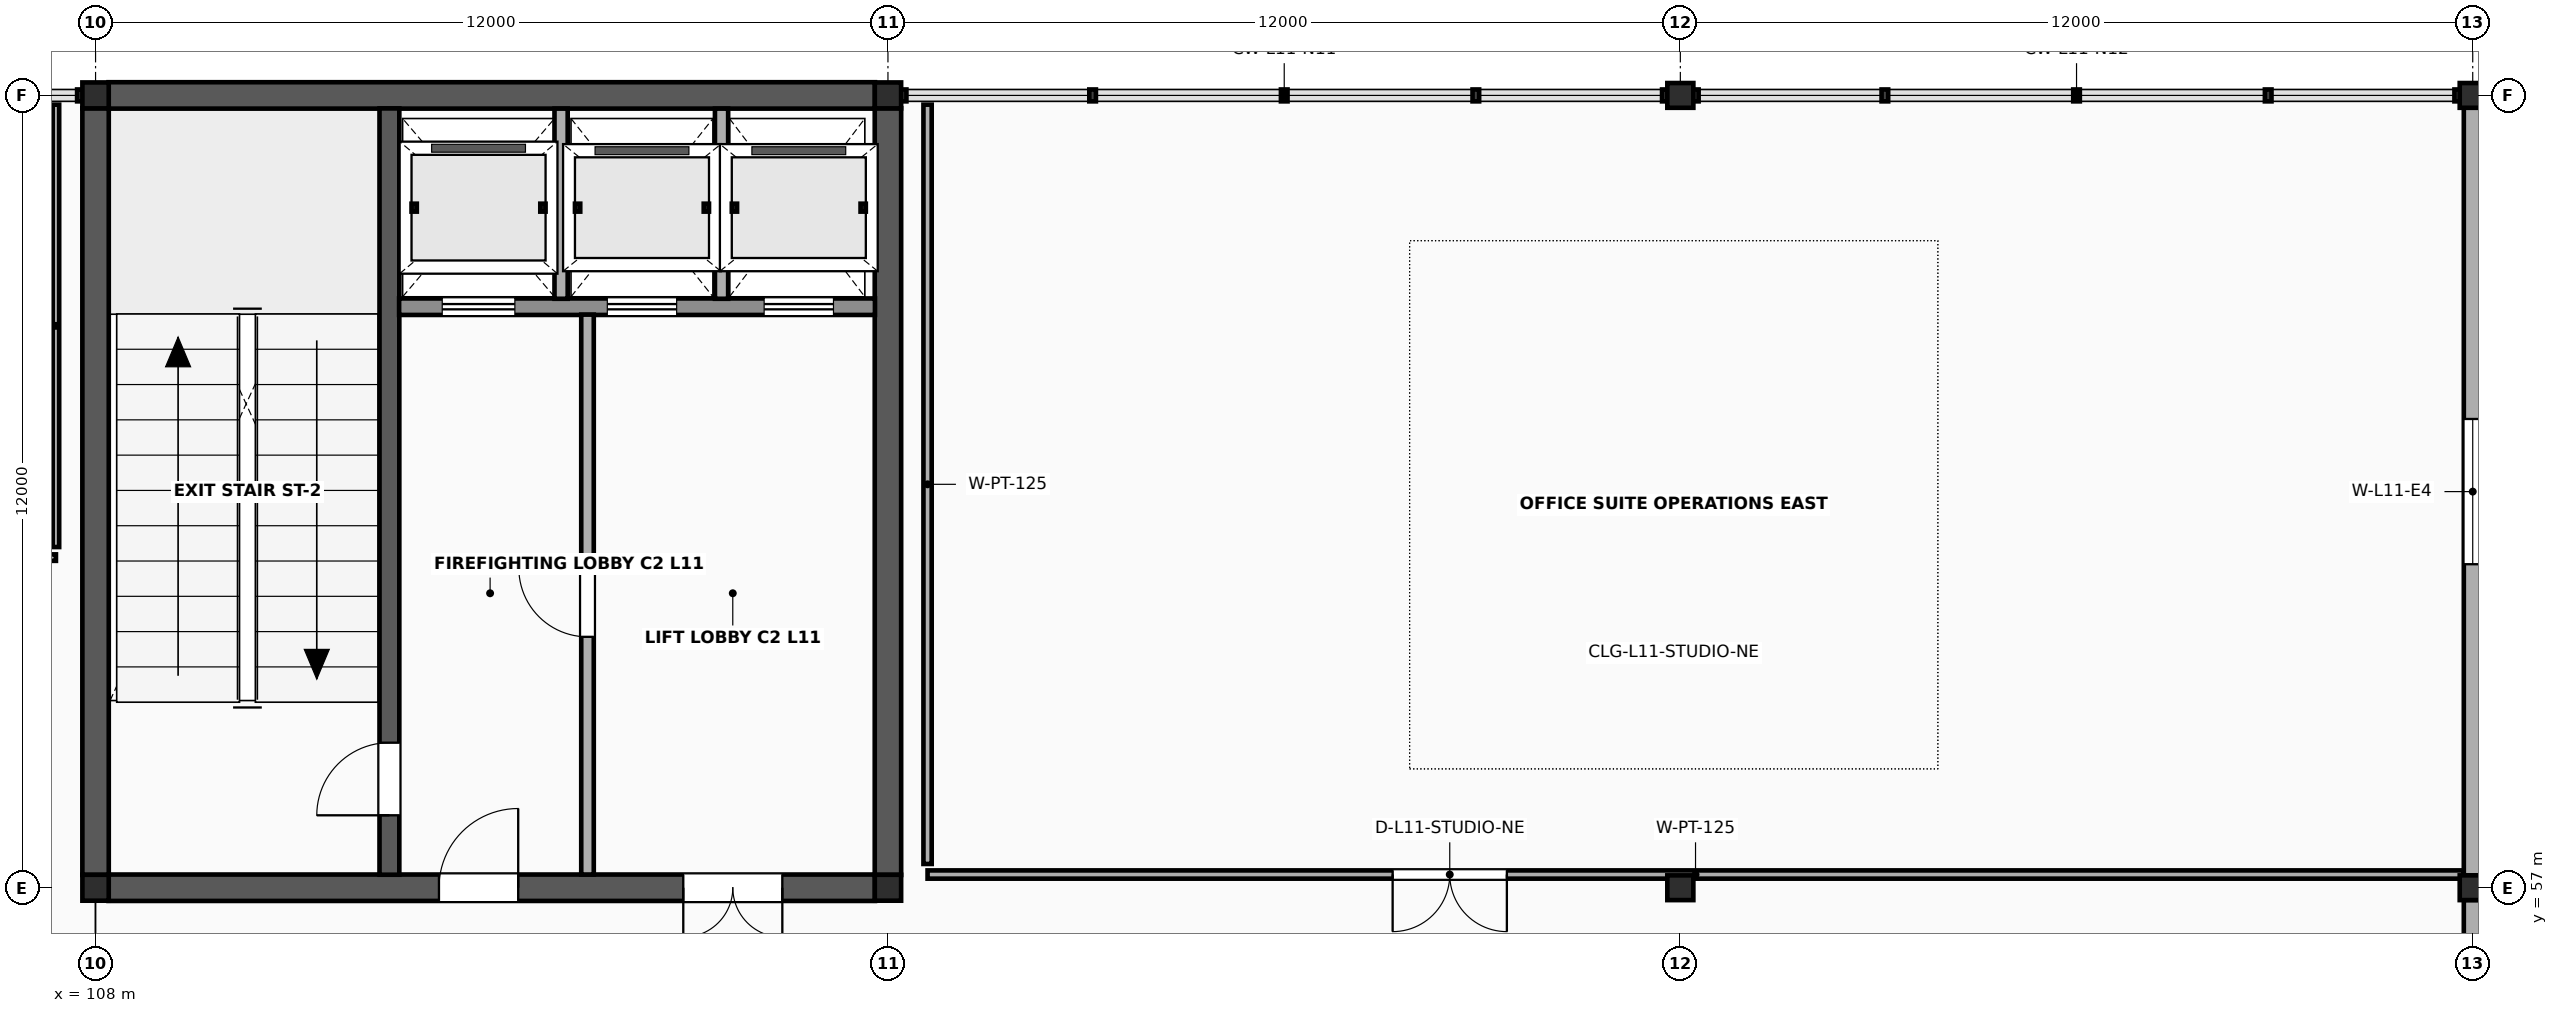
"""IFC4 building model, lengths in metres.
Left out: names, types, materials, properties, quantities, classifications, styles, units other than length and angle.
Written with IfcOpenShell. Run it as: python <this file> out.ifc"""

import sys

from ifc_helpers import new_model, si_unit, direction, frame, frame_2d, origin, origin_2d, place, context, subcontext, project, spatial, rectangle, i_section, extrude, element, fill, save


model = new_model("IFC4")
c1 = context("Model", 3, precision=1e-05, world=origin(), true_north=direction((0.0, 1.0)))
c2 = subcontext(c1, "Body", "Model", "MODEL_VIEW")
j1 = project(units=[si_unit("LENGTHUNIT", "METRE"), si_unit("PLANEANGLEUNIT", "RADIAN")], contexts=[c1])
p1 = place(None, origin())
s1 = spatial("IfcSite", under=j1, at=p1, CompositionType="ELEMENT")
p2 = place(p1, origin())
s2 = spatial("IfcBuilding", under=s1, at=p2, CompositionType="ELEMENT")
p3 = place(p2, frame((0.0, 0.0, 45.6)))
s3 = spatial("IfcBuildingStorey", under=s2, at=p3, CompositionType="ELEMENT", Elevation=45.6)
for number, where, z_axis, x_axis in (
    (1, (108.0, 57.0, 0.0), (0.0, 0.0, 1.0), (1.0, 0.0, 0.0)),
    (2, (108.0, 69.0, 0.0), (0.0, 0.0, 1.0), (1.0, 0.0, 0.0)),
    (3, (120.0, 57.0, 0.0), (0.0, 0.0, 1.0), (1.0, 0.0, 0.0)),
    (4, (120.0, 69.0, 0.0), (0.0, 0.0, 1.0), (1.0, 0.0, 0.0)),
):
    element("IfcColumn", number, at=place(p3, frame(where, z_axis=z_axis, x_axis=x_axis)), inside=s3, PredefinedType="COLUMN", context=c2, shape_type="SweptSolid", body=[
        extrude(i_section(OverallWidth=0.399, OverallDepth=0.393, WebThickness=0.023, FlangeThickness=0.037, FilletRadius=0.018, at=origin_2d()), origin(), (0.0, 0.0, 1.0), 4.0),
    ])
for number, where, z_axis, x_axis in (
    (5, (132.0, 57.0, 0.0), (0.0, 0.0, 1.0), (1.0, 0.0, 0.0)),
    (6, (132.0, 69.0, 0.0), (0.0, 0.0, 1.0), (1.0, 0.0, 0.0)),
    (7, (144.0, 57.0, 0.0), (0.0, 0.0, 1.0), (1.0, 0.0, 0.0)),
    (8, (144.0, 69.0, 0.0), (0.0, 0.0, 1.0), (1.0, 0.0, 0.0)),
):
    element("IfcColumn", number, at=place(p3, frame(where, z_axis=z_axis, x_axis=x_axis)), inside=s3, PredefinedType="COLUMN", context=c2, shape_type="SweptSolid", body=[
        extrude(i_section(OverallWidth=0.394, OverallDepth=0.375, WebThickness=0.017, FlangeThickness=0.028, FilletRadius=0.018, at=origin_2d()), origin(), (0.0, 0.0, 1.0), 4.0),
    ])
p4 = place(p3, frame((108.197, 57.0, 0.0), z_axis=(0.0, 0.0, 1.0), x_axis=(1.0, 0.0, 0.0)))
e9 = element("IfcWall", 9, at=p4, inside=s3, PredefinedType="SHEAR", context=c2, shape_type="SweptSolid", body=[
    extrude(rectangle(XDim=11.607, YDim=0.4, at=frame_2d((5.803, 0.0))), origin(), (0.0, 0.0, 1.0), 3.843),
])
p5 = place(p4, frame((5.004, 0.0, 0.0)))
e10 = element("IfcOpeningElement", 10, at=p5, cuts=e9, PredefinedType="OPENING", context=c2, shape_type="SweptSolid", body=[
    extrude(rectangle(XDim=1.2, YDim=2.2, at=frame_2d((0.6, 1.1))), frame((0.0, 0.215, 0.0), z_axis=(0.0, -1.0, 0.0), x_axis=(1.0, 0.0, 0.0)), (0.0, 0.0, 1.0), 0.43),
])
p6 = place(p4, frame((8.704, 0.0, 0.0)))
e11 = element("IfcOpeningElement", 11, at=p6, cuts=e9, PredefinedType="OPENING", context=c2, shape_type="SweptSolid", body=[
    extrude(rectangle(XDim=1.5, YDim=2.25, at=frame_2d((0.75, 1.125))), frame((0.0, 0.215, 0.0), z_axis=(0.0, -1.0, 0.0), x_axis=(1.0, 0.0, 0.0)), (0.0, 0.0, 1.0), 0.43),
])
p7 = place(p3, frame((108.197, 69.0, 0.0), z_axis=(0.0, 0.0, 1.0), x_axis=(1.0, 0.0, 0.0)))
e12 = element("IfcWall", 12, at=p7, inside=s3, PredefinedType="SHEAR", context=c2, shape_type="SweptSolid", body=[
    extrude(rectangle(XDim=11.607, YDim=0.4, at=frame_2d((5.803, 0.0))), origin(), (0.0, 0.0, 1.0), 3.843),
])
for number, where, z_axis, x_axis in (
    (13, (108.0, 57.194, 0.0), (0.0, 0.0, 1.0), (0.0, 1.0, 0.0)),
    (14, (120.0, 57.194, 0.0), (0.0, 0.0, 1.0), (0.0, 1.0, 0.0)),
):
    element("IfcWall", number, at=place(p3, frame(where, z_axis=z_axis, x_axis=x_axis)), inside=s3, PredefinedType="SHEAR", context=c2, shape_type="SweptSolid", body=[
        extrude(rectangle(XDim=11.613, YDim=0.4, at=frame_2d((5.806, 0.0))), origin(), (0.0, 0.0, 1.0), 3.843),
    ])
p8 = place(p3, frame((112.45, 57.197, 0.0), z_axis=(0.0, 0.0, 1.0), x_axis=(0.0, 1.0, 0.0)))
e15 = element("IfcWall", 15, at=p8, inside=s3, PredefinedType="SHEAR", context=c2, shape_type="SweptSolid", body=[
    extrude(rectangle(XDim=11.606, YDim=0.3, at=frame_2d((5.803, 0.0))), origin(), (0.0, 0.0, 1.0), 3.843),
])
p9 = place(p8, frame((0.9, 0.0, 0.0)))
e16 = element("IfcOpeningElement", 16, at=p9, cuts=e15, PredefinedType="OPENING", context=c2, shape_type="SweptSolid", body=[
    extrude(rectangle(XDim=1.1, YDim=2.2, at=frame_2d((0.55, 1.1))), frame((0.0, 0.165, 0.0), z_axis=(0.0, -1.0, 0.0), x_axis=(1.0, 0.0, 0.0)), (0.0, 0.0, 1.0), 0.33),
])
p10 = place(p3, frame((112.597, 65.8, 0.0), z_axis=(0.0, 0.0, 1.0), x_axis=(1.0, 0.0, 0.0)))
e17 = element("IfcWall", 17, at=p10, inside=s3, PredefinedType="SOLIDWALL", context=c2, shape_type="SweptSolid", body=[
    extrude(rectangle(XDim=7.206, YDim=0.25, at=frame_2d((3.603, 0.0))), origin(), (0.0, 0.0, 1.0), 3.843),
])
p11 = place(p10, frame((0.653, 0.0, 0.0)))
e18 = element("IfcOpeningElement", 18, at=p11, cuts=e17, PredefinedType="OPENING", context=c2, shape_type="SweptSolid", body=[
    extrude(rectangle(XDim=1.1, YDim=2.24, at=frame_2d((0.55, 1.12))), frame((0.0, 0.14, 0.0), z_axis=(0.0, -1.0, 0.0), x_axis=(1.0, 0.0, 0.0)), (0.0, 0.0, 1.0), 0.28),
])
p12 = place(p10, frame((3.153, 0.0, 0.0)))
e19 = element("IfcOpeningElement", 19, at=p12, cuts=e17, PredefinedType="OPENING", context=c2, shape_type="SweptSolid", body=[
    extrude(rectangle(XDim=1.05, YDim=2.2, at=frame_2d((0.525, 1.1))), frame((0.0, 0.14, 0.0), z_axis=(0.0, -1.0, 0.0), x_axis=(1.0, 0.0, 0.0)), (0.0, 0.0, 1.0), 0.28),
])
p13 = place(p10, frame((5.528, 0.0, 0.0)))
e20 = element("IfcOpeningElement", 20, at=p13, cuts=e17, PredefinedType="OPENING", context=c2, shape_type="SweptSolid", body=[
    extrude(rectangle(XDim=1.05, YDim=2.2, at=frame_2d((0.525, 1.1))), frame((0.0, 0.14, 0.0), z_axis=(0.0, -1.0, 0.0), x_axis=(1.0, 0.0, 0.0)), (0.0, 0.0, 1.0), 0.28),
])
for number, where, z_axis, x_axis in (
    (21, (115.05, 65.92, 0.0), (0.0, 0.0, 1.0), (0.0, 1.0, 0.0)),
    (22, (117.48, 65.92, 0.0), (0.0, 0.0, 1.0), (0.0, 1.0, 0.0)),
):
    element("IfcWall", number, at=place(p3, frame(where, z_axis=z_axis, x_axis=x_axis)), inside=s3, PredefinedType="SOLIDWALL", context=c2, shape_type="SweptSolid", body=[
        extrude(rectangle(XDim=2.88, YDim=0.2, at=frame_2d((1.44, 0.0))), origin(), (0.0, 0.0, 1.0), 3.833),
    ])
p14 = place(p3, frame((115.45, 57.2, 0.0), z_axis=(0.0, 0.0, 1.0), x_axis=(0.0, 1.0, 0.0)))
e23 = element("IfcWall", 23, at=p14, inside=s3, PredefinedType="SOLIDWALL", context=c2, shape_type="SweptSolid", body=[
    extrude(rectangle(XDim=8.48, YDim=0.19, at=frame_2d((4.24, 0.0))), origin(), (0.0, 0.0, 1.0), 3.833),
])
p15 = place(p14, frame((3.6, 0.0, 0.0)))
e24 = element("IfcOpeningElement", 24, at=p15, cuts=e23, PredefinedType="OPENING", context=c2, shape_type="SweptSolid", body=[
    extrude(rectangle(XDim=1.04, YDim=2.18, at=frame_2d((0.52, 1.09))), frame((0.0, 0.11, 0.0), z_axis=(0.0, -1.0, 0.0), x_axis=(1.0, 0.0, 0.0)), (0.0, 0.0, 1.0), 0.22),
])
p16 = place(p3, frame((144.0, 45.186, 0.0), z_axis=(0.0, 0.0, 1.0), x_axis=(0.0, 1.0, 0.0)))
e25 = element("IfcWall", 25, at=p16, inside=s3, PredefinedType="SOLIDWALL", context=c2, shape_type="SweptSolid", body=[
    extrude(rectangle(XDim=11.629, YDim=0.27, at=frame_2d((5.814, 0.0))), origin(), (0.0, 0.0, 1.0), 3.236),
])
p17 = place(p16, frame((4.79, 0.0, 0.78)))
e26 = element("IfcOpeningElement", 26, at=p17, cuts=e25, PredefinedType="OPENING", context=c2, shape_type="SweptSolid", body=[
    extrude(rectangle(XDim=2.05, YDim=1.25, at=frame_2d((1.025, 0.625))), frame((0.0, 0.15, 0.0), z_axis=(0.0, -1.0, 0.0), x_axis=(1.0, 0.0, 0.0)), (0.0, 0.0, 1.0), 0.3),
])
p18 = place(p3, frame((144.0, 57.186, 0.0), z_axis=(0.0, 0.0, 1.0), x_axis=(0.0, 1.0, 0.0)))
e27 = element("IfcWall", 27, at=p18, inside=s3, PredefinedType="SOLIDWALL", context=c2, shape_type="SweptSolid", body=[
    extrude(rectangle(XDim=11.629, YDim=0.27, at=frame_2d((5.814, 0.0))), origin(), (0.0, 0.0, 1.0), 3.236),
])
p19 = place(p18, frame((4.714, 0.0, 0.78)))
e28 = element("IfcOpeningElement", 28, at=p19, cuts=e27, PredefinedType="OPENING", context=c2, shape_type="SweptSolid", body=[
    extrude(rectangle(XDim=2.2, YDim=1.25, at=frame_2d((1.1, 0.625))), frame((0.0, 0.15, 0.0), z_axis=(0.0, -1.0, 0.0), x_axis=(1.0, 0.0, 0.0)), (0.0, 0.0, 1.0), 0.3),
])
p20 = place(p3, frame((84.6, 62.0, 0.0), z_axis=(0.0, 0.0, 1.0), x_axis=(1.0, 0.0, 0.0)))
e29 = element("IfcWall", 29, at=p20, inside=s3, PredefinedType="PARTITIONING", context=c2, shape_type="SweptSolid", body=[
    extrude(rectangle(XDim=22.8, YDim=0.098, at=frame_2d((11.4, 0.0))), origin(), (0.0, 0.0, 1.0), 2.88),
])
p21 = place(p20, frame((10.845, 0.0, 0.0)))
e30 = element("IfcOpeningElement", 30, at=p21, cuts=e29, PredefinedType="OPENING", context=c2, shape_type="SweptSolid", body=[
    extrude(rectangle(XDim=1.11, YDim=2.21, at=frame_2d((0.555, 1.105))), frame((0.0, 0.064, 0.0), z_axis=(0.0, -1.0, 0.0), x_axis=(1.0, 0.0, 0.0)), (0.0, 0.0, 1.0), 0.128),
])
p22 = place(p3, frame((107.4, 62.16, 0.0), z_axis=(0.0, 0.0, 1.0), x_axis=(0.0, 1.0, 0.0)))
e31 = element("IfcWall", 31, at=p22, inside=s3, PredefinedType="PARTITIONING", context=c2, shape_type="SweptSolid", body=[
    extrude(rectangle(XDim=6.7, YDim=0.098, at=frame_2d((3.35, 0.0))), origin(), (0.0, 0.0, 1.0), 2.88),
])
p23 = place(p3, frame((120.6, 57.2, 0.0), z_axis=(0.0, 0.0, 1.0), x_axis=(1.0, 0.0, 0.0)))
e32 = element("IfcWall", 32, at=p23, inside=s3, PredefinedType="PARTITIONING", context=c2, shape_type="SweptSolid", body=[
    extrude(rectangle(XDim=23.26, YDim=0.125, at=frame_2d((11.63, 0.0))), origin(), (0.0, 0.0, 1.0), 2.88),
])
p24 = place(p23, frame((7.043, 0.0, 0.0)))
e33 = element("IfcOpeningElement", 33, at=p24, cuts=e32, PredefinedType="OPENING", context=c2, shape_type="SweptSolid", body=[
    extrude(rectangle(XDim=1.73, YDim=2.37, at=frame_2d((0.865, 1.185))), frame((0.0, 0.077, 0.0), z_axis=(0.0, -1.0, 0.0), x_axis=(1.0, 0.0, 0.0)), (0.0, 0.0, 1.0), 0.155),
])
p25 = place(p3, frame((120.6, 57.36, 0.0), z_axis=(0.0, 0.0, 1.0), x_axis=(0.0, 1.0, 0.0)))
e34 = element("IfcWall", 34, at=p25, inside=s3, PredefinedType="PARTITIONING", context=c2, shape_type="SweptSolid", body=[
    extrude(rectangle(XDim=11.5, YDim=0.125, at=frame_2d((5.75, 0.0))), origin(), (0.0, 0.0, 1.0), 2.88),
])
p26 = place(p19, origin())
e35 = element("IfcWindow", 35, at=p26, inside=s3, PartitioningType="DOUBLE_PANEL_VERTICAL", PredefinedType="WINDOW", context=c2, shape_type="SweptSolid", body=[
    extrude(rectangle(XDim=2.2, YDim=1.25, at=frame_2d((1.1, 0.625))), frame((0.0, 0.03, 0.0), z_axis=(0.0, -1.0, 0.0), x_axis=(1.0, 0.0, 0.0)), (0.0, 0.0, 1.0), 0.06),
])
fill(e28, e35)
p27 = place(p9, origin())
e36 = element("IfcDoor", 36, at=p27, inside=s3, OperationType="SINGLE_SWING_LEFT", PredefinedType="DOOR", context=c2, shape_type="SweptSolid", body=[
    extrude(rectangle(XDim=1.1, YDim=2.2, at=frame_2d((0.55, 1.1))), frame((0.0, 0.025, 0.0), z_axis=(0.0, -1.0, 0.0), x_axis=(1.0, 0.0, 0.0)), (0.0, 0.0, 1.0), 0.05),
])
fill(e16, e36)
p28 = place(p15, origin())
e37 = element("IfcDoor", 37, at=p28, inside=s3, OperationType="SINGLE_SWING_RIGHT", PredefinedType="DOOR", context=c2, shape_type="SweptSolid", body=[
    extrude(rectangle(XDim=1.04, YDim=2.18, at=frame_2d((0.52, 1.09))), frame((0.0, 0.025, 0.0), z_axis=(0.0, -1.0, 0.0), x_axis=(1.0, 0.0, 0.0)), (0.0, 0.0, 1.0), 0.05),
])
fill(e24, e37)
p29 = place(p5, origin())
e38 = element("IfcDoor", 38, at=p29, inside=s3, OperationType="SINGLE_SWING_RIGHT", PredefinedType="DOOR", context=c2, shape_type="SweptSolid", body=[
    extrude(rectangle(XDim=1.2, YDim=2.2, at=frame_2d((0.6, 1.1))), frame((0.0, 0.025, 0.0), z_axis=(0.0, -1.0, 0.0), x_axis=(1.0, 0.0, 0.0)), (0.0, 0.0, 1.0), 0.05),
])
fill(e10, e38)
p30 = place(p6, origin())
e39 = element("IfcDoor", 39, at=p30, inside=s3, OperationType="DOUBLE_DOOR_SINGLE_SWING", PredefinedType="DOOR", context=c2, shape_type="SweptSolid", body=[
    extrude(rectangle(XDim=1.5, YDim=2.25, at=frame_2d((0.75, 1.125))), frame((0.0, 0.025, 0.0), z_axis=(0.0, -1.0, 0.0), x_axis=(1.0, 0.0, 0.0)), (0.0, 0.0, 1.0), 0.05),
])
fill(e11, e39)
p31 = place(p11, origin())
e40 = element("IfcDoor", 40, at=p31, inside=s3, OperationType="SLIDING_TO_LEFT", PredefinedType="USERDEFINED", context=c2, shape_type="SweptSolid", body=[
    extrude(rectangle(XDim=1.1, YDim=2.24, at=frame_2d((0.55, 1.12))), frame((0.0, 0.025, 0.0), z_axis=(0.0, -1.0, 0.0), x_axis=(1.0, 0.0, 0.0)), (0.0, 0.0, 1.0), 0.05),
])
fill(e18, e40)
p32 = place(p12, origin())
e41 = element("IfcDoor", 41, at=p32, inside=s3, OperationType="SLIDING_TO_LEFT", PredefinedType="USERDEFINED", context=c2, shape_type="SweptSolid", body=[
    extrude(rectangle(XDim=1.05, YDim=2.2, at=frame_2d((0.525, 1.1))), frame((0.0, 0.025, 0.0), z_axis=(0.0, -1.0, 0.0), x_axis=(1.0, 0.0, 0.0)), (0.0, 0.0, 1.0), 0.05),
])
fill(e19, e41)
p33 = place(p13, origin())
e42 = element("IfcDoor", 42, at=p33, inside=s3, OperationType="SLIDING_TO_LEFT", PredefinedType="USERDEFINED", context=c2, shape_type="SweptSolid", body=[
    extrude(rectangle(XDim=1.05, YDim=2.2, at=frame_2d((0.525, 1.1))), frame((0.0, 0.025, 0.0), z_axis=(0.0, -1.0, 0.0), x_axis=(1.0, 0.0, 0.0)), (0.0, 0.0, 1.0), 0.05),
])
fill(e20, e42)
p34 = place(p24, origin())
e43 = element("IfcDoor", 43, at=p34, inside=s3, OperationType="DOUBLE_DOOR_SINGLE_SWING", PredefinedType="DOOR", context=c2, shape_type="SweptSolid", body=[
    extrude(rectangle(XDim=1.73, YDim=2.37, at=frame_2d((0.865, 1.185))), frame((0.0, 0.025, 0.0), z_axis=(0.0, -1.0, 0.0), x_axis=(1.0, 0.0, 0.0)), (0.0, 0.0, 1.0), 0.05),
])
fill(e33, e43)
save(model, sys.argv[1])
